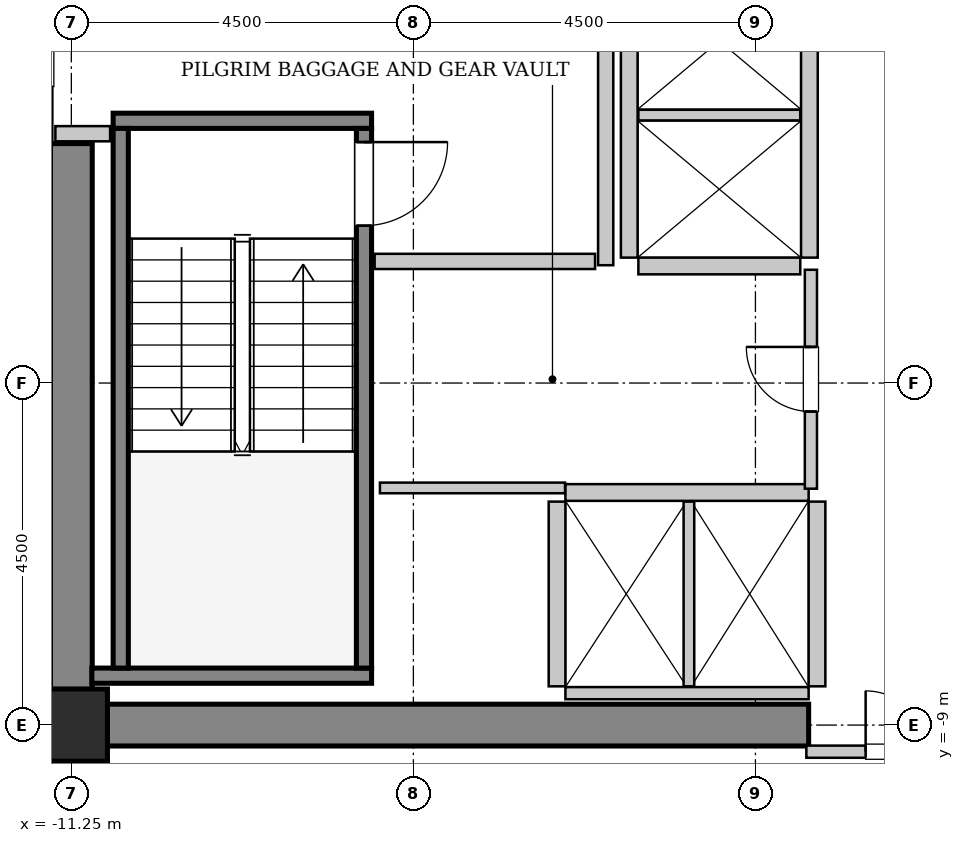
"""IFC4 building model, lengths in metres.
Left out: names, types, materials, properties, quantities, classifications, styles, units other than length and angle.
Written with IfcOpenShell. Run it as: python <this file> out.ifc"""

import sys

from ifc_helpers import new_model, si_unit, direction, frame, frame_2d, origin, origin_2d, place, context, subcontext, project, spatial, rectangle, hollow_rectangle, extrude, source, transform, mapped, element, fill, save


model = new_model("IFC4")
c1 = context("Model", 3, precision=1e-05, world=origin(), true_north=direction((0.0, 1.0)))
c2 = subcontext(c1, "Body", "Model", "MODEL_VIEW")
j1 = project(units=[si_unit("LENGTHUNIT", "METRE"), si_unit("PLANEANGLEUNIT", "RADIAN")], contexts=[c1])
p1 = place(None, origin())
s1 = spatial("IfcSite", under=j1, at=p1, CompositionType="ELEMENT")
p2 = place(p1, origin())
s2 = spatial("IfcBuilding", under=s1, at=p2, CompositionType="ELEMENT")
p3 = place(p2, frame((0.0, 0.0, 98.4)))
s3 = spatial("IfcBuildingStorey", under=s2, at=p3, CompositionType="ELEMENT", Elevation=98.4)
m1 = source(origin(), c2, "Body", "SweptSolid", [
    extrude(rectangle(XDim=9.975, YDim=0.55, at=frame_2d((4.987, 0.0))), origin(), (0.0, 0.0, 1.0), 3.8),
])
p4 = place(p3, frame((-11.525, -9.0, 0.0), z_axis=(0.0, 0.0, 1.0), x_axis=(1.0, 0.0, 0.0)))
e1 = element("IfcWall", 1, at=p4, inside=s3, PredefinedType="SHEAR", context=c2, shape_type="MappedRepresentation", body=[
    mapped(m1, transform((0.0, 0.0, 0.0), x_axis=(1.0, 0.0, 0.0), y_axis=(0.0, 1.0, 0.0), z_axis=(0.0, 0.0, 1.0), scale=1.0)),
])
m2 = source(origin(), c2, "Body", "SweptSolid", [
    extrude(rectangle(XDim=7.375, YDim=0.55, at=frame_2d((3.688, 0.0))), origin(), (0.0, 0.0, 1.0), 3.8),
])
p5 = place(p3, frame((-11.25, -8.725, 0.0), z_axis=(0.0, 0.0, 1.0), x_axis=(0.0, 1.0, 0.0)))
e2 = element("IfcWall", 2, at=p5, inside=s3, PredefinedType="SHEAR", context=c2, shape_type="MappedRepresentation", body=[
    mapped(m2, transform((0.0, 0.0, 0.0), x_axis=(1.0, 0.0, 0.0), y_axis=(0.0, 1.0, 0.0), z_axis=(0.0, 0.0, 1.0), scale=1.0)),
])
m3 = source(origin(), c2, "Body", "SweptSolid", [
    extrude(hollow_rectangle(XDim=0.95, YDim=0.95, WallThickness=0.045, InnerFilletRadius=0.045, OuterFilletRadius=0.09, at=origin_2d()), origin(), (0.0, 0.0, 1.0), 3.8),
])
p6 = place(p3, frame((-11.25, -9.0, 0.0), z_axis=(0.0, 0.0, 1.0), x_axis=(1.0, 0.0, 0.0)))
e3 = element("IfcColumn", 3, at=p6, inside=s3, PredefinedType="COLUMN", context=c2, shape_type="MappedRepresentation", body=[
    mapped(m3, transform((0.0, 0.0, 0.0), x_axis=(1.0, 0.0, 0.0), y_axis=(0.0, 1.0, 0.0), z_axis=(0.0, 0.0, 1.0), scale=1.0)),
])
m4 = source(origin(), c2, "Body", "SweptSolid", [
    extrude(rectangle(XDim=3.4, YDim=0.2, at=frame_2d((1.7, 0.0))), origin(), (0.0, 0.0, 1.0), 3.8),
])
p7 = place(p3, frame((-10.7, -1.05, 0.0), z_axis=(0.0, 0.0, 1.0), x_axis=(1.0, 0.0, 0.0)))
e4 = element("IfcWall", 4, at=p7, inside=s3, PredefinedType="SOLIDWALL", context=c2, shape_type="MappedRepresentation", body=[
    mapped(m4, transform((0.0, 0.0, 0.0), x_axis=(1.0, 0.0, 0.0), y_axis=(0.0, 1.0, 0.0), z_axis=(0.0, 0.0, 1.0), scale=1.0)),
])
m5 = source(origin(), c2, "Body", "SweptSolid", [
    extrude(rectangle(XDim=3.68, YDim=0.2, at=frame_2d((1.84, 0.0))), origin(), (0.0, 0.0, 1.0), 3.8),
])
p8 = place(p3, frame((-10.98, -8.35, 0.0), z_axis=(0.0, 0.0, 1.0), x_axis=(1.0, 0.0, 0.0)))
e5 = element("IfcWall", 5, at=p8, inside=s3, PredefinedType="SOLIDWALL", context=c2, shape_type="MappedRepresentation", body=[
    mapped(m5, transform((0.0, 0.0, 0.0), x_axis=(1.0, 0.0, 0.0), y_axis=(0.0, 1.0, 0.0), z_axis=(0.0, 0.0, 1.0), scale=1.0)),
])
m6 = source(origin(), c2, "Body", "SweptSolid", [
    extrude(rectangle(XDim=7.1, YDim=0.2, at=frame_2d((3.55, 0.0))), origin(), (0.0, 0.0, 1.0), 3.8),
])
p9 = place(p3, frame((-10.6, -1.15, 0.0), z_axis=(0.0, 0.0, 1.0), x_axis=(0.0, -1.0, 0.0)))
e6 = element("IfcWall", 6, at=p9, inside=s3, PredefinedType="SOLIDWALL", context=c2, shape_type="MappedRepresentation", body=[
    mapped(m6, transform((0.0, 0.0, 0.0), x_axis=(1.0, 0.0, 0.0), y_axis=(0.0, 1.0, 0.0), z_axis=(0.0, 0.0, 1.0), scale=1.0)),
])
p10 = place(p3, frame((-7.4, -1.15, 0.0), z_axis=(0.0, 0.0, 1.0), x_axis=(0.0, -1.0, 0.0)))
e7 = element("IfcWall", 7, at=p10, inside=s3, PredefinedType="SOLIDWALL", context=c2, shape_type="MappedRepresentation", body=[
    mapped(m6, transform((0.0, 0.0, 0.0), x_axis=(1.0, 0.0, 0.0), y_axis=(0.0, 1.0, 0.0), z_axis=(0.0, 0.0, 1.0), scale=1.0)),
])
p11 = place(p10, frame((0.18, 0.0, 0.0)))
e8 = element("IfcOpeningElement", 8, at=p11, cuts=e7, PredefinedType="OPENING", context=c2, shape_type="SweptSolid", body=[
    extrude(rectangle(XDim=1.1, YDim=2.15, at=frame_2d((0.55, 1.075))), frame((0.0, 0.11, 0.0), z_axis=(0.0, -1.0, 0.0), x_axis=(1.0, 0.0, 0.0)), (0.0, 0.0, 1.0), 0.22),
])
m7 = source(origin(), c2, "Body", "SweptSolid", [
    extrude(rectangle(XDim=3.2, YDim=0.22, at=frame_2d((1.6, 0.0))), origin(), (0.0, 0.0, 1.0), 3.535),
])
p12 = place(p3, frame((-1.55, -5.94, 0.0), z_axis=(0.0, 0.0, 1.0), x_axis=(-1.0, 0.0, 0.0)))
e9 = element("IfcWall", 9, at=p12, inside=s3, PredefinedType="SOLIDWALL", context=c2, shape_type="MappedRepresentation", body=[
    mapped(m7, transform((0.0, 0.0, 0.0), x_axis=(1.0, 0.0, 0.0), y_axis=(0.0, 1.0, 0.0), z_axis=(0.0, 0.0, 1.0), scale=1.0)),
])
m8 = source(origin(), c2, "Body", "SweptSolid", [
    extrude(rectangle(XDim=3.2, YDim=0.16, at=frame_2d((1.6, 0.0))), origin(), (0.0, 0.0, 1.0), 2.425),
])
p13 = place(p3, frame((-4.75, -8.58, 0.0), z_axis=(0.0, 0.0, 1.0), x_axis=(1.0, 0.0, 0.0)))
e10 = element("IfcWall", 10, at=p13, inside=s3, PredefinedType="PARTITIONING", context=c2, shape_type="MappedRepresentation", body=[
    mapped(m8, transform((0.0, 0.0, 0.0), x_axis=(1.0, 0.0, 0.0), y_axis=(0.0, 1.0, 0.0), z_axis=(0.0, 0.0, 1.0), scale=1.0)),
])
m9 = source(origin(), c2, "Body", "SweptSolid", [
    extrude(rectangle(XDim=2.43, YDim=0.22, at=frame_2d((1.215, 0.0))), origin(), (0.0, 0.0, 1.0), 3.535),
])
p14 = place(p3, frame((-4.86, -6.06, 0.0), z_axis=(0.0, 0.0, 1.0), x_axis=(0.0, -1.0, 0.0)))
e11 = element("IfcWall", 11, at=p14, inside=s3, PredefinedType="SOLIDWALL", context=c2, shape_type="MappedRepresentation", body=[
    mapped(m9, transform((0.0, 0.0, 0.0), x_axis=(1.0, 0.0, 0.0), y_axis=(0.0, 1.0, 0.0), z_axis=(0.0, 0.0, 1.0), scale=1.0)),
])
m10 = source(origin(), c2, "Body", "SweptSolid", [
    extrude(rectangle(XDim=2.43, YDim=0.14, at=frame_2d((1.215, 0.0))), origin(), (0.0, 0.0, 1.0), 3.535),
])
p15 = place(p3, frame((-3.125, -8.49, 0.0), z_axis=(0.0, 0.0, 1.0), x_axis=(0.0, 1.0, 0.0)))
e12 = element("IfcWall", 12, at=p15, inside=s3, PredefinedType="PARTITIONING", context=c2, shape_type="MappedRepresentation", body=[
    mapped(m10, transform((0.0, 0.0, 0.0), x_axis=(1.0, 0.0, 0.0), y_axis=(0.0, 1.0, 0.0), z_axis=(0.0, 0.0, 1.0), scale=1.0)),
])
p16 = place(p3, frame((-1.44, -8.49, 0.0), z_axis=(0.0, 0.0, 1.0), x_axis=(0.0, 1.0, 0.0)))
e13 = element("IfcWall", 13, at=p16, inside=s3, PredefinedType="SOLIDWALL", context=c2, shape_type="MappedRepresentation", body=[
    mapped(m9, transform((0.0, 0.0, 0.0), x_axis=(1.0, 0.0, 0.0), y_axis=(0.0, 1.0, 0.0), z_axis=(0.0, 0.0, 1.0), scale=1.0)),
])
m11 = source(origin(), c2, "Body", "SweptSolid", [
    extrude(rectangle(XDim=5.7, YDim=0.22, at=frame_2d((2.85, 0.0))), origin(), (0.0, 0.0, 1.0), 3.535),
])
for number, where, z_axis, x_axis in (
    (14, (-1.54, -2.85, 0.0), (0.0, 0.0, 1.0), (0.0, 1.0, 0.0)),
    (15, (-3.91, 2.85, 0.0), (0.0, 0.0, 1.0), (0.0, -1.0, 0.0)),
):
    element("IfcWall", number, at=place(p3, frame(where, z_axis=z_axis, x_axis=x_axis)), inside=s3, PredefinedType="SOLIDWALL", context=c2, shape_type="MappedRepresentation", body=[
        mapped(m11, transform((0.0, 0.0, 0.0), x_axis=(1.0, 0.0, 0.0), y_axis=(0.0, 1.0, 0.0), z_axis=(0.0, 0.0, 1.0), scale=1.0)),
    ])
m12 = source(origin(), c2, "Body", "SweptSolid", [
    extrude(rectangle(XDim=2.13, YDim=0.22, at=frame_2d((1.065, 0.0))), origin(), (0.0, 0.0, 1.0), 3.535),
])
p17 = place(p3, frame((-3.79, -2.96, 0.0), z_axis=(0.0, 0.0, 1.0), x_axis=(1.0, 0.0, 0.0)))
e16 = element("IfcWall", 16, at=p17, inside=s3, PredefinedType="SOLIDWALL", context=c2, shape_type="MappedRepresentation", body=[
    mapped(m12, transform((0.0, 0.0, 0.0), x_axis=(1.0, 0.0, 0.0), y_axis=(0.0, 1.0, 0.0), z_axis=(0.0, 0.0, 1.0), scale=1.0)),
])
m13 = source(origin(), c2, "Body", "SweptSolid", [
    extrude(rectangle(XDim=2.13, YDim=0.14, at=frame_2d((1.065, 0.0))), origin(), (0.0, 0.0, 1.0), 3.535),
])
p18 = place(p3, frame((-3.79, -0.975, 0.0), z_axis=(0.0, 0.0, 1.0), x_axis=(1.0, 0.0, 0.0)))
e17 = element("IfcWall", 17, at=p18, inside=s3, PredefinedType="PARTITIONING", context=c2, shape_type="MappedRepresentation", body=[
    mapped(m13, transform((0.0, 0.0, 0.0), x_axis=(1.0, 0.0, 0.0), y_axis=(0.0, 1.0, 0.0), z_axis=(0.0, 0.0, 1.0), scale=1.0)),
])
m14 = source(origin(), c2, "Body", "SweptSolid", [
    extrude(rectangle(XDim=5.9, YDim=0.2, at=frame_2d((2.95, 0.0))), origin(), (0.0, 0.0, 1.0), 3.535),
])
p19 = place(p3, frame((-4.22, -2.95, 0.0), z_axis=(0.0, 0.0, 1.0), x_axis=(0.0, 1.0, 0.0)))
e18 = element("IfcWall", 18, at=p19, inside=s3, PredefinedType="PARTITIONING", context=c2, shape_type="MappedRepresentation", body=[
    mapped(m14, transform((0.0, 0.0, 0.0), x_axis=(1.0, 0.0, 0.0), y_axis=(0.0, 1.0, 0.0), z_axis=(0.0, 0.0, 1.0), scale=1.0)),
])
m15 = source(origin(), c2, "Body", "SweptSolid", [
    extrude(rectangle(XDim=2.9, YDim=0.2, at=frame_2d((1.45, 0.0))), origin(), (0.0, 0.0, 1.0), 3.535),
])
p20 = place(p3, frame((-7.26, -2.9, 0.0), z_axis=(0.0, 0.0, 1.0), x_axis=(1.0, 0.0, 0.0)))
e19 = element("IfcWall", 19, at=p20, inside=s3, PredefinedType="PARTITIONING", context=c2, shape_type="MappedRepresentation", body=[
    mapped(m15, transform((0.0, 0.0, 0.0), x_axis=(1.0, 0.0, 0.0), y_axis=(0.0, 1.0, 0.0), z_axis=(0.0, 0.0, 1.0), scale=1.0)),
])
m16 = source(origin(), c2, "Body", "SweptSolid", [
    extrude(rectangle(XDim=0.72, YDim=0.2, at=frame_2d((0.36, 0.0))), origin(), (0.0, 0.0, 1.0), 3.535),
])
p21 = place(p3, frame((-11.46, -1.22, 0.0), z_axis=(0.0, 0.0, 1.0), x_axis=(1.0, 0.0, 0.0)))
e20 = element("IfcWall", 20, at=p21, inside=s3, PredefinedType="PARTITIONING", context=c2, shape_type="MappedRepresentation", body=[
    mapped(m16, transform((0.0, 0.0, 0.0), x_axis=(1.0, 0.0, 0.0), y_axis=(0.0, 1.0, 0.0), z_axis=(0.0, 0.0, 1.0), scale=1.0)),
])
m17 = source(origin(), c2, "Body", "SweptSolid", [
    extrude(rectangle(XDim=3.16, YDim=0.16, at=frame_2d((1.58, 0.0))), origin(), (0.0, 0.0, 1.0), 2.425),
])
p22 = place(p3, frame((-1.58, -9.35, 0.0), z_axis=(0.0, 0.0, 1.0), x_axis=(1.0, 0.0, 0.0)))
e21 = element("IfcWall", 21, at=p22, inside=s3, PredefinedType="PARTITIONING", context=c2, shape_type="MappedRepresentation", body=[
    mapped(m17, transform((0.0, 0.0, 0.0), x_axis=(1.0, 0.0, 0.0), y_axis=(0.0, 1.0, 0.0), z_axis=(0.0, 0.0, 1.0), scale=1.0)),
])
p23 = place(p22, frame((0.78, 0.0, 0.0)))
e22 = element("IfcOpeningElement", 22, at=p23, cuts=e21, PredefinedType="OPENING", context=c2, shape_type="SweptSolid", body=[
    extrude(rectangle(XDim=1.6, YDim=2.3, at=frame_2d((0.8, 1.15))), frame((0.0, 0.09, 0.0), z_axis=(0.0, -1.0, 0.0), x_axis=(1.0, 0.0, 0.0)), (0.0, 0.0, 1.0), 0.18),
])
m18 = source(origin(), c2, "Body", "SweptSolid", [
    extrude(rectangle(XDim=2.88, YDim=0.16, at=frame_2d((1.44, 0.0))), origin(), (0.0, 0.0, 1.0), 3.535),
])
p24 = place(p3, frame((-1.52, -5.89, 0.0), z_axis=(0.0, 0.0, 1.0), x_axis=(0.0, 1.0, 0.0)))
e23 = element("IfcWall", 23, at=p24, inside=s3, PredefinedType="PARTITIONING", context=c2, shape_type="MappedRepresentation", body=[
    mapped(m18, transform((0.0, 0.0, 0.0), x_axis=(1.0, 0.0, 0.0), y_axis=(0.0, 1.0, 0.0), z_axis=(0.0, 0.0, 1.0), scale=1.0)),
])
p25 = place(p24, frame((1.015, 0.0, 0.0)))
e24 = element("IfcOpeningElement", 24, at=p25, cuts=e23, PredefinedType="OPENING", context=c2, shape_type="SweptSolid", body=[
    extrude(rectangle(XDim=0.85, YDim=2.1, at=frame_2d((0.425, 1.05))), frame((0.0, 0.09, 0.0), z_axis=(0.0, -1.0, 0.0), x_axis=(1.0, 0.0, 0.0)), (0.0, 0.0, 1.0), 0.18),
])
m19 = source(origin(), c2, "Body", "SweptSolid", [
    extrude(rectangle(XDim=2.435, YDim=0.14, at=frame_2d((1.218, 0.0))), origin(), (0.0, 0.0, 1.0), 3.535),
])
p26 = place(p3, frame((-7.19, -5.88, 0.0), z_axis=(0.0, 0.0, 1.0), x_axis=(1.0, 0.0, 0.0)))
e25 = element("IfcWall", 25, at=p26, inside=s3, PredefinedType="PARTITIONING", context=c2, shape_type="MappedRepresentation", body=[
    mapped(m19, transform((0.0, 0.0, 0.0), x_axis=(1.0, 0.0, 0.0), y_axis=(0.0, 1.0, 0.0), z_axis=(0.0, 0.0, 1.0), scale=1.0)),
])
m20 = source(origin(), c2, "Body", "SweptSolid", [
    extrude(rectangle(XDim=1.1, YDim=2.15, at=frame_2d((0.55, 1.075))), frame((0.0, 0.025, 0.0), z_axis=(0.0, -1.0, 0.0), x_axis=(1.0, 0.0, 0.0)), (0.0, 0.0, 1.0), 0.05),
])
p27 = place(p11, origin())
e26 = element("IfcDoor", 26, at=p27, inside=s3, OperationType="SINGLE_SWING_LEFT", PredefinedType="DOOR", context=c2, shape_type="MappedRepresentation", body=[
    mapped(m20, transform((0.0, 0.0, 0.0), x_axis=(1.0, 0.0, 0.0), y_axis=(0.0, 1.0, 0.0), z_axis=(0.0, 0.0, 1.0), scale=1.0)),
])
fill(e8, e26)
m21 = source(origin(), c2, "Body", "SweptSolid", [
    extrude(rectangle(XDim=1.6, YDim=2.3, at=frame_2d((0.8, 1.15))), frame((0.0, 0.025, 0.0), z_axis=(0.0, -1.0, 0.0), x_axis=(1.0, 0.0, 0.0)), (0.0, 0.0, 1.0), 0.05),
])
p28 = place(p23, origin())
e27 = element("IfcDoor", 27, at=p28, inside=s3, OperationType="DOUBLE_DOOR_SINGLE_SWING", PredefinedType="DOOR", context=c2, shape_type="MappedRepresentation", body=[
    mapped(m21, transform((0.0, 0.0, 0.0), x_axis=(1.0, 0.0, 0.0), y_axis=(0.0, 1.0, 0.0), z_axis=(0.0, 0.0, 1.0), scale=1.0)),
])
fill(e22, e27)
m22 = source(origin(), c2, "Body", "SweptSolid", [
    extrude(rectangle(XDim=0.85, YDim=2.1, at=frame_2d((0.425, 1.05))), frame((0.0, 0.025, 0.0), z_axis=(0.0, -1.0, 0.0), x_axis=(1.0, 0.0, 0.0)), (0.0, 0.0, 1.0), 0.05),
])
p29 = place(p25, origin())
e28 = element("IfcDoor", 28, at=p29, inside=s3, OperationType="SINGLE_SWING_RIGHT", PredefinedType="DOOR", context=c2, shape_type="MappedRepresentation", body=[
    mapped(m22, transform((0.0, 0.0, 0.0), x_axis=(1.0, 0.0, 0.0), y_axis=(0.0, 1.0, 0.0), z_axis=(0.0, 0.0, 1.0), scale=1.0)),
])
fill(e24, e28)
save(model, sys.argv[1])
